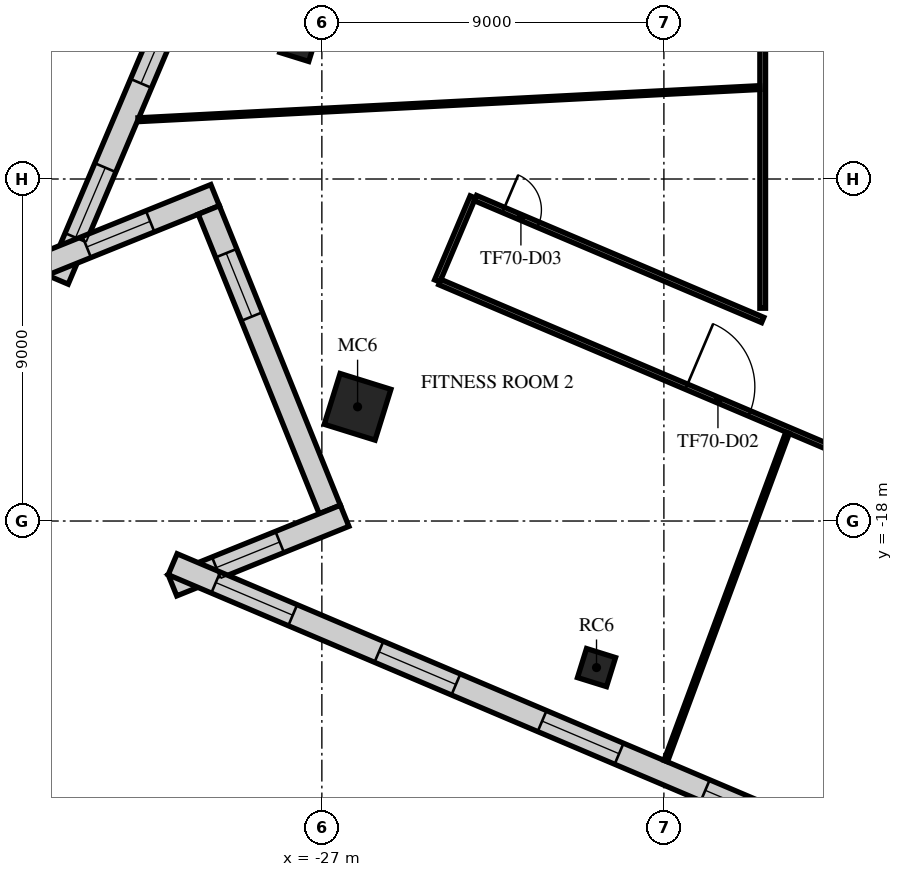
"""IFC4 building model, lengths in metres.
Left out: names, types, materials, properties, quantities, classifications, styles, units other than length and angle.
Written with IfcOpenShell. Run it as: python <this file> out.ifc"""

import sys

from ifc_helpers import new_model, si_unit, direction, frame, frame_2d, origin, origin_2d, place, context, subcontext, project, spatial, rectangle, extrude, element, fill, save


model = new_model("IFC4")
c1 = context("Model", 3, precision=1e-05, world=origin(), true_north=direction((0.0, 1.0)))
c2 = subcontext(c1, "Body", "Model", "MODEL_VIEW")
j1 = project(units=[si_unit("LENGTHUNIT", "METRE"), si_unit("PLANEANGLEUNIT", "RADIAN")], contexts=[c1])
p1 = place(None, origin())
s1 = spatial("IfcSite", under=j1, at=p1, CompositionType="ELEMENT")
p2 = place(p1, origin())
s2 = spatial("IfcBuilding", under=s1, at=p2, CompositionType="ELEMENT")
p3 = place(p2, frame((0.0, 0.0, 300.5)))
s3 = spatial("IfcBuildingStorey", under=s2, at=p3, CompositionType="ELEMENT", Elevation=300.5)
p4 = place(p3, frame((-27.608, -5.406, 0.0), z_axis=(0.0, 0.0, 1.0), x_axis=(0.297503182032, 0.954720826567, 0.0)))
e1 = element("IfcColumn", 1, at=p4, inside=s3, PredefinedType="COLUMN", context=c2, shape_type="SweptSolid", body=[
    extrude(rectangle(XDim=0.8, YDim=0.8, at=origin_2d()), origin(), (0.0, 0.0, 1.0), 4.0),
])
p5 = place(p3, frame((-26.06, -14.995, 0.0), z_axis=(0.0, 0.0, 1.0), x_axis=(0.297503182032, 0.954720826567, 0.0)))
e2 = element("IfcColumn", 2, at=p5, inside=s3, PredefinedType="COLUMN", context=c2, shape_type="SweptSolid", body=[
    extrude(rectangle(XDim=1.4, YDim=1.4, at=origin_2d()), origin(), (0.0, 0.0, 1.0), 4.0),
])
p6 = place(p3, frame((-19.773, -21.857, 0.0), z_axis=(0.0, 0.0, 1.0), x_axis=(0.297503182032, 0.954720826567, 0.0)))
e3 = element("IfcColumn", 3, at=p6, inside=s3, PredefinedType="COLUMN", context=c2, shape_type="SweptSolid", body=[
    extrude(rectangle(XDim=0.8, YDim=0.8, at=origin_2d()), origin(), (0.0, 0.0, 1.0), 4.0),
])
p7 = place(p3, frame((-15.005, 32.985, 0.0), z_axis=(0.0, 0.0, 1.0), x_axis=(-0.39073034436, -0.920505186295, 0.0)))
e4 = element("IfcWall", 4, at=p7, inside=s3, PredefinedType="STANDARD", context=c2, shape_type="SweptSolid", body=[
    extrude(rectangle(XDim=48.49, YDim=0.6, at=frame_2d((24.245, 0.0))), origin(), (0.0, 0.0, 1.0), 3.65),
])
p8 = place(p7, frame((1.204, 0.0, 0.9)))
e5 = element("IfcOpeningElement", 5, at=p8, cuts=e4, PredefinedType="OPENING", context=c2, shape_type="SweptSolid", body=[
    extrude(rectangle(XDim=2.0, YDim=2.1, at=frame_2d((1.0, 1.05))), frame((0.0, 0.31, 0.0), z_axis=(0.0, -1.0, 0.0), x_axis=(1.0, 0.0, 0.0)), (0.0, 0.0, 1.0), 0.62),
])
p9 = place(p7, frame((5.612, 0.0, 0.9)))
e6 = element("IfcOpeningElement", 6, at=p9, cuts=e4, PredefinedType="OPENING", context=c2, shape_type="SweptSolid", body=[
    extrude(rectangle(XDim=2.0, YDim=2.1, at=frame_2d((1.0, 1.05))), frame((0.0, 0.31, 0.0), z_axis=(0.0, -1.0, 0.0), x_axis=(1.0, 0.0, 0.0)), (0.0, 0.0, 1.0), 0.62),
])
p10 = place(p7, frame((10.021, 0.0, 0.9)))
e7 = element("IfcOpeningElement", 7, at=p10, cuts=e4, PredefinedType="OPENING", context=c2, shape_type="SweptSolid", body=[
    extrude(rectangle(XDim=2.0, YDim=2.1, at=frame_2d((1.0, 1.05))), frame((0.0, 0.31, 0.0), z_axis=(0.0, -1.0, 0.0), x_axis=(1.0, 0.0, 0.0)), (0.0, 0.0, 1.0), 0.62),
])
p11 = place(p7, frame((14.428, 0.0, 0.9)))
e8 = element("IfcOpeningElement", 8, at=p11, cuts=e4, PredefinedType="OPENING", context=c2, shape_type="SweptSolid", body=[
    extrude(rectangle(XDim=2.0, YDim=2.1, at=frame_2d((1.0, 1.05))), frame((0.0, 0.31, 0.0), z_axis=(0.0, -1.0, 0.0), x_axis=(1.0, 0.0, 0.0)), (0.0, 0.0, 1.0), 0.62),
])
p12 = place(p7, frame((18.837, 0.0, 0.9)))
e9 = element("IfcOpeningElement", 9, at=p12, cuts=e4, PredefinedType="OPENING", context=c2, shape_type="SweptSolid", body=[
    extrude(rectangle(XDim=2.0, YDim=2.1, at=frame_2d((1.0, 1.05))), frame((0.0, 0.31, 0.0), z_axis=(0.0, -1.0, 0.0), x_axis=(1.0, 0.0, 0.0)), (0.0, 0.0, 1.0), 0.62),
])
p13 = place(p7, frame((23.245, 0.0, 0.9)))
e10 = element("IfcOpeningElement", 10, at=p13, cuts=e4, PredefinedType="OPENING", context=c2, shape_type="SweptSolid", body=[
    extrude(rectangle(XDim=2.0, YDim=2.1, at=frame_2d((1.0, 1.05))), frame((0.0, 0.31, 0.0), z_axis=(0.0, -1.0, 0.0), x_axis=(1.0, 0.0, 0.0)), (0.0, 0.0, 1.0), 0.62),
])
p14 = place(p7, frame((27.653, 0.0, 0.9)))
e11 = element("IfcOpeningElement", 11, at=p14, cuts=e4, PredefinedType="OPENING", context=c2, shape_type="SweptSolid", body=[
    extrude(rectangle(XDim=2.0, YDim=2.1, at=frame_2d((1.0, 1.05))), frame((0.0, 0.31, 0.0), z_axis=(0.0, -1.0, 0.0), x_axis=(1.0, 0.0, 0.0)), (0.0, 0.0, 1.0), 0.62),
])
p15 = place(p7, frame((32.061, 0.0, 0.9)))
e12 = element("IfcOpeningElement", 12, at=p15, cuts=e4, PredefinedType="OPENING", context=c2, shape_type="SweptSolid", body=[
    extrude(rectangle(XDim=2.0, YDim=2.1, at=frame_2d((1.0, 1.05))), frame((0.0, 0.31, 0.0), z_axis=(0.0, -1.0, 0.0), x_axis=(1.0, 0.0, 0.0)), (0.0, 0.0, 1.0), 0.62),
])
p16 = place(p7, frame((36.469, 0.0, 0.9)))
e13 = element("IfcOpeningElement", 13, at=p16, cuts=e4, PredefinedType="OPENING", context=c2, shape_type="SweptSolid", body=[
    extrude(rectangle(XDim=2.0, YDim=2.1, at=frame_2d((1.0, 1.05))), frame((0.0, 0.31, 0.0), z_axis=(0.0, -1.0, 0.0), x_axis=(1.0, 0.0, 0.0)), (0.0, 0.0, 1.0), 0.62),
])
p17 = place(p7, frame((40.877, 0.0, 0.9)))
e14 = element("IfcOpeningElement", 14, at=p17, cuts=e4, PredefinedType="OPENING", context=c2, shape_type="SweptSolid", body=[
    extrude(rectangle(XDim=2.0, YDim=2.1, at=frame_2d((1.0, 1.05))), frame((0.0, 0.31, 0.0), z_axis=(0.0, -1.0, 0.0), x_axis=(1.0, 0.0, 0.0)), (0.0, 0.0, 1.0), 0.62),
])
p18 = place(p7, frame((45.285, 0.0, 0.9)))
e15 = element("IfcOpeningElement", 15, at=p18, cuts=e4, PredefinedType="OPENING", context=c2, shape_type="SweptSolid", body=[
    extrude(rectangle(XDim=2.0, YDim=2.1, at=frame_2d((1.0, 1.05))), frame((0.0, 0.31, 0.0), z_axis=(0.0, -1.0, 0.0), x_axis=(1.0, 0.0, 0.0)), (0.0, 0.0, 1.0), 0.62),
])
p19 = place(p3, frame((-34.34, -11.255, 0.0), z_axis=(0.0, 0.0, 1.0), x_axis=(0.927189106571, 0.374593593988, 0.0)))
e16 = element("IfcWall", 16, at=p19, inside=s3, PredefinedType="STANDARD", context=c2, shape_type="SweptSolid", body=[
    extrude(rectangle(XDim=4.885, YDim=0.6, at=frame_2d((2.443, 0.0))), origin(), (0.0, 0.0, 1.0), 3.65),
])
p20 = place(p19, frame((1.243, 0.0, 0.9)))
e17 = element("IfcOpeningElement", 17, at=p20, cuts=e16, PredefinedType="OPENING", context=c2, shape_type="SweptSolid", body=[
    extrude(rectangle(XDim=1.8, YDim=2.1, at=frame_2d((0.9, 1.05))), frame((0.0, 0.31, 0.0), z_axis=(0.0, -1.0, 0.0), x_axis=(1.0, 0.0, 0.0)), (0.0, 0.0, 1.0), 0.62),
])
p21 = place(p3, frame((-29.976, -9.815, 0.0), z_axis=(0.0, 0.0, 1.0), x_axis=(0.374622134294, -0.927177575493, 0.0)))
e18 = element("IfcWall", 18, at=p21, inside=s3, PredefinedType="STANDARD", context=c2, shape_type="SweptSolid", body=[
    extrude(rectangle(XDim=8.5, YDim=0.6, at=frame_2d((4.25, 0.0))), origin(), (0.0, 0.0, 1.0), 3.65),
])
p22 = place(p21, frame((1.225, 0.0, 0.9)))
e19 = element("IfcOpeningElement", 19, at=p22, cuts=e18, PredefinedType="OPENING", context=c2, shape_type="SweptSolid", body=[
    extrude(rectangle(XDim=1.8, YDim=2.1, at=frame_2d((0.9, 1.05))), frame((0.0, 0.31, 0.0), z_axis=(0.0, -1.0, 0.0), x_axis=(1.0, 0.0, 0.0)), (0.0, 0.0, 1.0), 0.62),
])
p23 = place(p3, frame((-26.401, -17.862, 0.0), z_axis=(0.0, 0.0, 1.0), x_axis=(-0.927189106571, -0.374593593988, 0.0)))
e20 = element("IfcWall", 20, at=p23, inside=s3, PredefinedType="STANDARD", context=c2, shape_type="SweptSolid", body=[
    extrude(rectangle(XDim=4.885, YDim=0.6, at=frame_2d((2.443, 0.0))), origin(), (0.0, 0.0, 1.0), 3.65),
])
p24 = place(p23, frame((1.843, 0.0, 0.9)))
e21 = element("IfcOpeningElement", 21, at=p24, cuts=e20, PredefinedType="OPENING", context=c2, shape_type="SweptSolid", body=[
    extrude(rectangle(XDim=1.8, YDim=2.1, at=frame_2d((0.9, 1.05))), frame((0.0, 0.31, 0.0), z_axis=(0.0, -1.0, 0.0), x_axis=(1.0, 0.0, 0.0)), (0.0, 0.0, 1.0), 0.62),
])
p25 = place(p3, frame((-30.926, -19.138, 0.0), z_axis=(0.0, 0.0, 1.0), x_axis=(0.920504905663, -0.39073100549, 0.0)))
e22 = element("IfcWall", 22, at=p25, inside=s3, PredefinedType="STANDARD", context=c2, shape_type="SweptSolid", body=[
    extrude(rectangle(XDim=41.979, YDim=0.6, at=frame_2d((20.99, 0.0))), origin(), (0.0, 0.0, 1.0), 3.65),
])
p26 = place(p25, frame((1.232, 0.0, 0.9)))
e23 = element("IfcOpeningElement", 23, at=p26, cuts=e22, PredefinedType="OPENING", context=c2, shape_type="SweptSolid", body=[
    extrude(rectangle(XDim=2.2, YDim=2.1, at=frame_2d((1.1, 1.05))), frame((0.0, 0.31, 0.0), z_axis=(0.0, -1.0, 0.0), x_axis=(1.0, 0.0, 0.0)), (0.0, 0.0, 1.0), 0.62),
])
p27 = place(p25, frame((5.896, 0.0, 0.9)))
e24 = element("IfcOpeningElement", 24, at=p27, cuts=e22, PredefinedType="OPENING", context=c2, shape_type="SweptSolid", body=[
    extrude(rectangle(XDim=2.2, YDim=2.1, at=frame_2d((1.1, 1.05))), frame((0.0, 0.31, 0.0), z_axis=(0.0, -1.0, 0.0), x_axis=(1.0, 0.0, 0.0)), (0.0, 0.0, 1.0), 0.62),
])
p28 = place(p25, frame((10.561, 0.0, 0.9)))
e25 = element("IfcOpeningElement", 25, at=p28, cuts=e22, PredefinedType="OPENING", context=c2, shape_type="SweptSolid", body=[
    extrude(rectangle(XDim=2.2, YDim=2.1, at=frame_2d((1.1, 1.05))), frame((0.0, 0.31, 0.0), z_axis=(0.0, -1.0, 0.0), x_axis=(1.0, 0.0, 0.0)), (0.0, 0.0, 1.0), 0.62),
])
p29 = place(p25, frame((15.225, 0.0, 0.9)))
e26 = element("IfcOpeningElement", 26, at=p29, cuts=e22, PredefinedType="OPENING", context=c2, shape_type="SweptSolid", body=[
    extrude(rectangle(XDim=2.2, YDim=2.1, at=frame_2d((1.1, 1.05))), frame((0.0, 0.31, 0.0), z_axis=(0.0, -1.0, 0.0), x_axis=(1.0, 0.0, 0.0)), (0.0, 0.0, 1.0), 0.62),
])
p30 = place(p25, frame((19.89, 0.0, 0.9)))
e27 = element("IfcOpeningElement", 27, at=p30, cuts=e22, PredefinedType="OPENING", context=c2, shape_type="SweptSolid", body=[
    extrude(rectangle(XDim=2.2, YDim=2.1, at=frame_2d((1.1, 1.05))), frame((0.0, 0.31, 0.0), z_axis=(0.0, -1.0, 0.0), x_axis=(1.0, 0.0, 0.0)), (0.0, 0.0, 1.0), 0.62),
])
p31 = place(p25, frame((24.554, 0.0, 0.9)))
e28 = element("IfcOpeningElement", 28, at=p31, cuts=e22, PredefinedType="OPENING", context=c2, shape_type="SweptSolid", body=[
    extrude(rectangle(XDim=2.2, YDim=2.1, at=frame_2d((1.1, 1.05))), frame((0.0, 0.31, 0.0), z_axis=(0.0, -1.0, 0.0), x_axis=(1.0, 0.0, 0.0)), (0.0, 0.0, 1.0), 0.62),
])
p32 = place(p25, frame((29.218, 0.0, 0.9)))
e29 = element("IfcOpeningElement", 29, at=p32, cuts=e22, PredefinedType="OPENING", context=c2, shape_type="SweptSolid", body=[
    extrude(rectangle(XDim=2.2, YDim=2.1, at=frame_2d((1.1, 1.05))), frame((0.0, 0.31, 0.0), z_axis=(0.0, -1.0, 0.0), x_axis=(1.0, 0.0, 0.0)), (0.0, 0.0, 1.0), 0.62),
])
p33 = place(p25, frame((33.883, 0.0, 0.9)))
e30 = element("IfcOpeningElement", 30, at=p33, cuts=e22, PredefinedType="OPENING", context=c2, shape_type="SweptSolid", body=[
    extrude(rectangle(XDim=2.2, YDim=2.1, at=frame_2d((1.1, 1.05))), frame((0.0, 0.31, 0.0), z_axis=(0.0, -1.0, 0.0), x_axis=(1.0, 0.0, 0.0)), (0.0, 0.0, 1.0), 0.62),
])
p34 = place(p25, frame((38.547, 0.0, 0.9)))
e31 = element("IfcOpeningElement", 31, at=p34, cuts=e22, PredefinedType="OPENING", context=c2, shape_type="SweptSolid", body=[
    extrude(rectangle(XDim=2.2, YDim=2.1, at=frame_2d((1.1, 1.05))), frame((0.0, 0.31, 0.0), z_axis=(0.0, -1.0, 0.0), x_axis=(1.0, 0.0, 0.0)), (0.0, 0.0, 1.0), 0.62),
])
p35 = place(p3, frame((-23.965, -11.682, 0.0), z_axis=(0.0, 0.0, 1.0), x_axis=(0.390356552854, 0.920663761448, 0.0)))
e32 = element("IfcWall", 32, at=p35, inside=s3, PredefinedType="PARTITIONING", context=c2, shape_type="SweptSolid", body=[
    extrude(rectangle(XDim=2.4, YDim=0.15, at=frame_2d((1.2, 0.0))), origin(), (0.0, 0.0, 1.0), 3.25),
])
p36 = place(p3, frame((-23.896, -11.711, 0.0), z_axis=(0.0, 0.0, 1.0), x_axis=(0.920507643781, -0.390724554821, 0.0)))
e33 = element("IfcWall", 33, at=p36, inside=s3, PredefinedType="PARTITIONING", context=c2, shape_type="SweptSolid", body=[
    extrude(rectangle(XDim=34.917, YDim=0.15, at=frame_2d((17.458, 0.0))), origin(), (0.0, 0.0, 1.0), 3.25),
])
p37 = place(p36, frame((7.05, 0.0, 0.0)))
e34 = element("IfcOpeningElement", 34, at=p37, cuts=e33, PredefinedType="OPENING", context=c2, shape_type="SweptSolid", body=[
    extrude(rectangle(XDim=1.8, YDim=2.1, at=frame_2d((0.9, 1.05))), frame((0.0, 0.085, 0.0), z_axis=(0.0, -1.0, 0.0), x_axis=(1.0, 0.0, 0.0)), (0.0, 0.0, 1.0), 0.17),
])
p38 = place(p36, frame((14.27, 0.0, 0.0)))
e35 = element("IfcOpeningElement", 35, at=p38, cuts=e33, PredefinedType="OPENING", context=c2, shape_type="SweptSolid", body=[
    extrude(rectangle(XDim=1.0, YDim=2.1, at=frame_2d((0.5, 1.05))), frame((0.0, 0.085, 0.0), z_axis=(0.0, -1.0, 0.0), x_axis=(1.0, 0.0, 0.0)), (0.0, 0.0, 1.0), 0.17),
])
p39 = place(p36, frame((29.011, 0.0, 0.0)))
e36 = element("IfcOpeningElement", 36, at=p39, cuts=e33, PredefinedType="OPENING", context=c2, shape_type="SweptSolid", body=[
    extrude(rectangle(XDim=1.0, YDim=2.1, at=frame_2d((0.5, 1.05))), frame((0.0, 0.085, 0.0), z_axis=(0.0, -1.0, 0.0), x_axis=(1.0, 0.0, 0.0)), (0.0, 0.0, 1.0), 0.17),
])
p40 = place(p3, frame((-22.959, -9.501, 0.0), z_axis=(0.0, 0.0, 1.0), x_axis=(0.920500461351, -0.390741475471, 0.0)))
e37 = element("IfcWall", 37, at=p40, inside=s3, PredefinedType="PARTITIONING", context=c2, shape_type="SweptSolid", body=[
    extrude(rectangle(XDim=8.212, YDim=0.15, at=frame_2d((4.106, 0.0))), origin(), (0.0, 0.0, 1.0), 3.25),
])
p41 = place(p40, frame((0.8, 0.0, 0.0)))
e38 = element("IfcOpeningElement", 38, at=p41, cuts=e37, PredefinedType="OPENING", context=c2, shape_type="SweptSolid", body=[
    extrude(rectangle(XDim=1.0, YDim=2.1, at=frame_2d((0.5, 1.05))), frame((0.0, 0.085, 0.0), z_axis=(0.0, -1.0, 0.0), x_axis=(1.0, 0.0, 0.0)), (0.0, 0.0, 1.0), 0.17),
])
p42 = place(p3, frame((-15.4, -12.4, 0.0), z_axis=(0.0, 0.0, 1.0), x_axis=(0.0, 1.0, 0.0)))
e39 = element("IfcWall", 39, at=p42, inside=s3, PredefinedType="PARTITIONING", context=c2, shape_type="SweptSolid", body=[
    extrude(rectangle(XDim=27.8, YDim=0.15, at=frame_2d((13.9, 0.0))), origin(), (0.0, 0.0, 1.0), 3.25),
])
p43 = place(p42, frame((7.608, 0.0, 0.0)))
e40 = element("IfcOpeningElement", 40, at=p43, cuts=e39, PredefinedType="OPENING", context=c2, shape_type="SweptSolid", body=[
    extrude(rectangle(XDim=1.0, YDim=2.1, at=frame_2d((0.5, 1.05))), frame((0.0, 0.085, 0.0), z_axis=(0.0, -1.0, 0.0), x_axis=(1.0, 0.0, 0.0)), (0.0, 0.0, 1.0), 0.17),
])
p44 = place(p42, frame((16.435, 0.0, 0.0)))
e41 = element("IfcOpeningElement", 41, at=p44, cuts=e39, PredefinedType="OPENING", context=c2, shape_type="SweptSolid", body=[
    extrude(rectangle(XDim=1.0, YDim=2.1, at=frame_2d((0.5, 1.05))), frame((0.0, 0.085, 0.0), z_axis=(0.0, -1.0, 0.0), x_axis=(1.0, 0.0, 0.0)), (0.0, 0.0, 1.0), 0.17),
])
p45 = place(p3, frame((-31.836, -7.44, 0.0), z_axis=(0.0, 0.0, 1.0), x_axis=(0.998664003793, 0.05167405082, 0.0)))
e42 = element("IfcWall", 42, at=p45, inside=s3, PredefinedType="PARTITIONING", context=c2, shape_type="SweptSolid", body=[
    extrude(rectangle(XDim=16.38, YDim=0.1, at=frame_2d((8.19, 0.0))), origin(), (0.0, 0.0, 1.0), 3.65),
])
p46 = place(p3, frame((-17.952, -24.317, 0.0), z_axis=(0.0, 0.0, 1.0), x_axis=(0.348014202779, 0.937489261093, 0.0)))
e43 = element("IfcWall", 43, at=p46, inside=s3, PredefinedType="PARTITIONING", context=c2, shape_type="SweptSolid", body=[
    extrude(rectangle(XDim=9.213, YDim=0.1, at=frame_2d((4.606, 0.0))), origin(), (0.0, 0.0, 1.0), 3.25),
])
p47 = place(p17, origin())
e44 = element("IfcWindow", 44, at=p47, inside=s3, PartitioningType="SINGLE_PANEL", PredefinedType="WINDOW", context=c2, shape_type="SweptSolid", body=[
    extrude(rectangle(XDim=2.0, YDim=2.1, at=frame_2d((1.0, 1.05))), frame((0.0, 0.03, 0.0), z_axis=(0.0, -1.0, 0.0), x_axis=(1.0, 0.0, 0.0)), (0.0, 0.0, 1.0), 0.06),
])
fill(e14, e44)
p48 = place(p18, origin())
e45 = element("IfcWindow", 45, at=p48, inside=s3, PartitioningType="SINGLE_PANEL", PredefinedType="WINDOW", context=c2, shape_type="SweptSolid", body=[
    extrude(rectangle(XDim=2.0, YDim=2.1, at=frame_2d((1.0, 1.05))), frame((0.0, 0.03, 0.0), z_axis=(0.0, -1.0, 0.0), x_axis=(1.0, 0.0, 0.0)), (0.0, 0.0, 1.0), 0.06),
])
fill(e15, e45)
p49 = place(p20, origin())
e46 = element("IfcWindow", 46, at=p49, inside=s3, PartitioningType="SINGLE_PANEL", PredefinedType="WINDOW", context=c2, shape_type="SweptSolid", body=[
    extrude(rectangle(XDim=1.8, YDim=2.1, at=frame_2d((0.9, 1.05))), frame((0.0, 0.03, 0.0), z_axis=(0.0, -1.0, 0.0), x_axis=(1.0, 0.0, 0.0)), (0.0, 0.0, 1.0), 0.06),
])
fill(e17, e46)
p50 = place(p22, origin())
e47 = element("IfcWindow", 47, at=p50, inside=s3, PartitioningType="SINGLE_PANEL", PredefinedType="WINDOW", context=c2, shape_type="SweptSolid", body=[
    extrude(rectangle(XDim=1.8, YDim=2.1, at=frame_2d((0.9, 1.05))), frame((0.0, 0.03, 0.0), z_axis=(0.0, -1.0, 0.0), x_axis=(1.0, 0.0, 0.0)), (0.0, 0.0, 1.0), 0.06),
])
fill(e19, e47)
p51 = place(p24, origin())
e48 = element("IfcWindow", 48, at=p51, inside=s3, PartitioningType="SINGLE_PANEL", PredefinedType="WINDOW", context=c2, shape_type="SweptSolid", body=[
    extrude(rectangle(XDim=1.8, YDim=2.1, at=frame_2d((0.9, 1.05))), frame((0.0, 0.03, 0.0), z_axis=(0.0, -1.0, 0.0), x_axis=(1.0, 0.0, 0.0)), (0.0, 0.0, 1.0), 0.06),
])
fill(e21, e48)
p52 = place(p26, origin())
e49 = element("IfcWindow", 49, at=p52, inside=s3, PartitioningType="SINGLE_PANEL", PredefinedType="WINDOW", context=c2, shape_type="SweptSolid", body=[
    extrude(rectangle(XDim=2.2, YDim=2.1, at=frame_2d((1.1, 1.05))), frame((0.0, 0.03, 0.0), z_axis=(0.0, -1.0, 0.0), x_axis=(1.0, 0.0, 0.0)), (0.0, 0.0, 1.0), 0.06),
])
fill(e23, e49)
p53 = place(p27, origin())
e50 = element("IfcWindow", 50, at=p53, inside=s3, PartitioningType="SINGLE_PANEL", PredefinedType="WINDOW", context=c2, shape_type="SweptSolid", body=[
    extrude(rectangle(XDim=2.2, YDim=2.1, at=frame_2d((1.1, 1.05))), frame((0.0, 0.03, 0.0), z_axis=(0.0, -1.0, 0.0), x_axis=(1.0, 0.0, 0.0)), (0.0, 0.0, 1.0), 0.06),
])
fill(e24, e50)
p54 = place(p28, origin())
e51 = element("IfcWindow", 51, at=p54, inside=s3, PartitioningType="SINGLE_PANEL", PredefinedType="WINDOW", context=c2, shape_type="SweptSolid", body=[
    extrude(rectangle(XDim=2.2, YDim=2.1, at=frame_2d((1.1, 1.05))), frame((0.0, 0.03, 0.0), z_axis=(0.0, -1.0, 0.0), x_axis=(1.0, 0.0, 0.0)), (0.0, 0.0, 1.0), 0.06),
])
fill(e25, e51)
p55 = place(p29, origin())
e52 = element("IfcWindow", 52, at=p55, inside=s3, PartitioningType="SINGLE_PANEL", PredefinedType="WINDOW", context=c2, shape_type="SweptSolid", body=[
    extrude(rectangle(XDim=2.2, YDim=2.1, at=frame_2d((1.1, 1.05))), frame((0.0, 0.03, 0.0), z_axis=(0.0, -1.0, 0.0), x_axis=(1.0, 0.0, 0.0)), (0.0, 0.0, 1.0), 0.06),
])
fill(e26, e52)
p56 = place(p37, frame((1.8, 0.0, 0.0), z_axis=(0.0, 0.0, 1.0), x_axis=(-1.0, 0.0, 0.0)))
e53 = element("IfcDoor", 53, at=p56, inside=s3, OperationType="DOUBLE_DOOR_SINGLE_SWING", PredefinedType="DOOR", context=c2, shape_type="SweptSolid", body=[
    extrude(rectangle(XDim=1.8, YDim=2.1, at=frame_2d((0.9, 1.05))), frame((0.0, 0.025, 0.0), z_axis=(0.0, -1.0, 0.0), x_axis=(1.0, 0.0, 0.0)), (0.0, 0.0, 1.0), 0.05),
])
fill(e34, e53)
p57 = place(p41, origin())
e54 = element("IfcDoor", 54, at=p57, inside=s3, OperationType="SINGLE_SWING_RIGHT", PredefinedType="DOOR", context=c2, shape_type="SweptSolid", body=[
    extrude(rectangle(XDim=1.0, YDim=2.1, at=frame_2d((0.5, 1.05))), frame((0.0, 0.025, 0.0), z_axis=(0.0, -1.0, 0.0), x_axis=(1.0, 0.0, 0.0)), (0.0, 0.0, 1.0), 0.05),
])
fill(e38, e54)
save(model, sys.argv[1])
